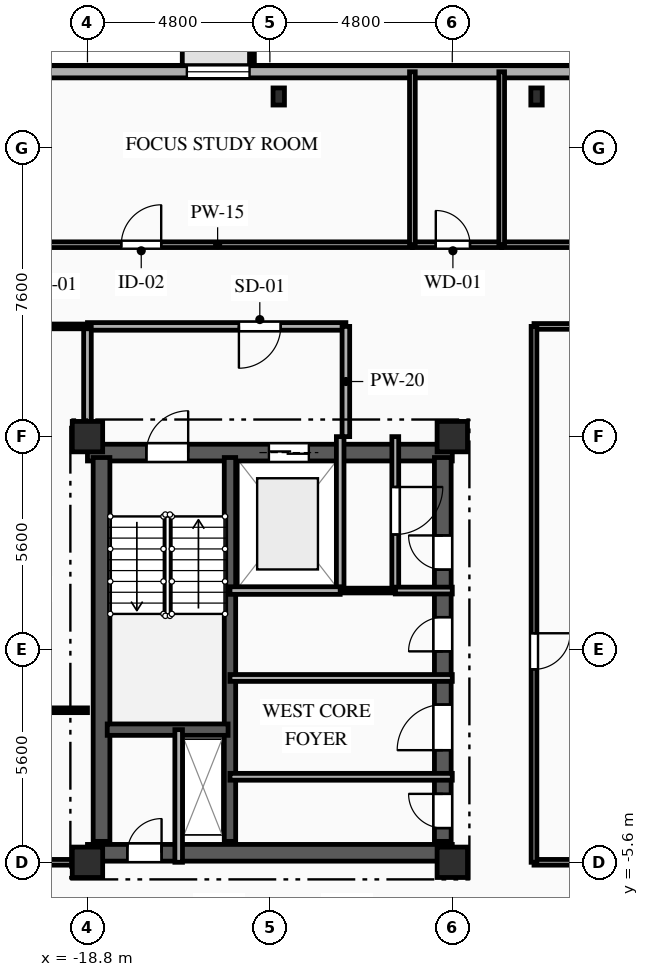
"""IFC4 building model, lengths in metres.
Left out: names, types, materials, properties, quantities, classifications, styles, units other than length and angle.
Written with IfcOpenShell. Run it as: python <this file> out.ifc"""

import sys

from ifc_helpers import new_model, si_unit, direction, frame, frame_2d, origin, origin_2d, place, context, subcontext, project, spatial, rectangle, i_section, extrude, element, fill, save


model = new_model("IFC4")
c1 = context("Model", 3, precision=1e-05, world=origin(), true_north=direction((0.0, 1.0)))
c2 = subcontext(c1, "Body", "Model", "MODEL_VIEW")
j1 = project(units=[si_unit("LENGTHUNIT", "METRE"), si_unit("PLANEANGLEUNIT", "RADIAN")], contexts=[c1])
p1 = place(None, origin())
s1 = spatial("IfcSite", under=j1, at=p1, CompositionType="ELEMENT")
p2 = place(p1, origin())
s2 = spatial("IfcBuilding", under=s1, at=p2, CompositionType="ELEMENT")
p3 = place(p2, frame((0.0, 0.0, 235.0)))
s3 = spatial("IfcBuildingStorey", under=s2, at=p3, CompositionType="ELEMENT", Elevation=235.0)
for number, where, z_axis, x_axis in (
    (1, (-18.8, -5.6, 0.0), (0.0, 0.0, 1.0), (1.0, 0.0, 0.0)),
    (2, (-18.8, 5.6, 0.0), (0.0, 0.0, 1.0), (1.0, 0.0, 0.0)),
    (3, (-9.2, -5.6, 0.0), (0.0, 0.0, 1.0), (1.0, 0.0, 0.0)),
    (4, (-9.2, 5.6, 0.0), (0.0, 0.0, 1.0), (1.0, 0.0, 0.0)),
):
    element("IfcColumn", number, at=place(p3, frame(where, z_axis=z_axis, x_axis=x_axis)), inside=s3, PredefinedType="COLUMN", context=c2, shape_type="SweptSolid", body=[
        extrude(rectangle(XDim=0.8, YDim=0.8, at=origin_2d()), origin(), (0.0, 0.0, 1.0), 3.35),
    ])
for number, where, z_axis, x_axis in (
    (5, (-6.983, 14.55, 0.0), (0.0, 0.0, 1.0), (1.0, 0.0, 0.0)),
    (6, (-13.767, 14.55, 0.0), (0.0, 0.0, 1.0), (1.0, 0.0, 0.0)),
):
    element("IfcColumn", number, at=place(p3, frame(where, z_axis=z_axis, x_axis=x_axis)), inside=s3, PredefinedType="COLUMN", context=c2, shape_type="SweptSolid", body=[
        extrude(i_section(OverallWidth=0.3, OverallDepth=0.45, WebThickness=0.014, FlangeThickness=0.026, FilletRadius=0.027, at=origin_2d()), origin(), (0.0, 0.0, 1.0), 3.35),
    ])
p4 = place(p3, frame((-21.2, 15.2, 0.0), z_axis=(0.0, 0.0, 1.0), x_axis=(1.0, 0.0, 0.0)))
e7 = element("IfcWall", 7, at=p4, inside=s3, PredefinedType="SOLIDWALL", context=c2, shape_type="SweptSolid", body=[
    extrude(rectangle(XDim=42.0, YDim=0.32, at=frame_2d((21.0, 0.0))), origin(), (0.0, 0.0, 1.0), 3.04),
])
p5 = place(p4, frame((5.015, 0.0, 0.85)))
e8 = element("IfcOpeningElement", 8, at=p5, cuts=e7, PredefinedType="OPENING", context=c2, shape_type="SweptSolid", body=[
    extrude(rectangle(XDim=1.65, YDim=1.85, at=frame_2d((0.825, 0.925))), frame((0.0, 0.17, 0.0), z_axis=(0.0, -1.0, 0.0), x_axis=(1.0, 0.0, 0.0)), (0.0, 0.0, 1.0), 0.34),
])
p6 = place(p4, frame((16.53, 0.0, 0.85)))
e9 = element("IfcOpeningElement", 9, at=p6, cuts=e7, PredefinedType="OPENING", context=c2, shape_type="SweptSolid", body=[
    extrude(rectangle(XDim=1.5, YDim=1.85, at=frame_2d((0.75, 0.925))), frame((0.0, 0.17, 0.0), z_axis=(0.0, -1.0, 0.0), x_axis=(1.0, 0.0, 0.0)), (0.0, 0.0, 1.0), 0.34),
])
p7 = place(p4, frame((25.575, 0.0, 0.85)))
e10 = element("IfcOpeningElement", 10, at=p7, cuts=e7, PredefinedType="OPENING", context=c2, shape_type="SweptSolid", body=[
    extrude(rectangle(XDim=1.65, YDim=1.85, at=frame_2d((0.825, 0.925))), frame((0.0, 0.17, 0.0), z_axis=(0.0, -1.0, 0.0), x_axis=(1.0, 0.0, 0.0)), (0.0, 0.0, 1.0), 0.34),
])
p8 = place(p4, frame((35.735, 0.0, 0.85)))
e11 = element("IfcOpeningElement", 11, at=p8, cuts=e7, PredefinedType="OPENING", context=c2, shape_type="SweptSolid", body=[
    extrude(rectangle(XDim=1.65, YDim=1.85, at=frame_2d((0.825, 0.925))), frame((0.0, 0.17, 0.0), z_axis=(0.0, -1.0, 0.0), x_axis=(1.0, 0.0, 0.0)), (0.0, 0.0, 1.0), 0.34),
])
p9 = place(p3, frame((-18.8, 5.18, 0.0), z_axis=(0.0, 0.0, 1.0), x_axis=(1.0, 0.0, 0.0)))
e12 = element("IfcWall", 12, at=p9, inside=s3, PredefinedType="SHEAR", context=c2, shape_type="SweptSolid", body=[
    extrude(rectangle(XDim=9.6, YDim=0.44, at=frame_2d((4.8, 0.0))), origin(), (0.0, 0.0, 1.0), 3.04),
])
p10 = place(p9, frame((1.55, 0.0, 0.0)))
e13 = element("IfcOpeningElement", 13, at=p10, cuts=e12, PredefinedType="OPENING", context=c2, shape_type="SweptSolid", body=[
    extrude(rectangle(XDim=1.1, YDim=2.15, at=frame_2d((0.55, 1.075))), frame((0.0, 0.23, 0.0), z_axis=(0.0, -1.0, 0.0), x_axis=(1.0, 0.0, 0.0)), (0.0, 0.0, 1.0), 0.46),
])
p11 = place(p9, frame((4.775, 0.0, 0.0)))
e14 = element("IfcOpeningElement", 14, at=p11, cuts=e12, PredefinedType="OPENING", context=c2, shape_type="SweptSolid", body=[
    extrude(rectangle(XDim=1.05, YDim=2.1, at=frame_2d((0.525, 1.05))), frame((0.0, 0.23, 0.0), z_axis=(0.0, -1.0, 0.0), x_axis=(1.0, 0.0, 0.0)), (0.0, 0.0, 1.0), 0.46),
])
p12 = place(p3, frame((-18.8, -5.35, 0.0), z_axis=(0.0, 0.0, 1.0), x_axis=(1.0, 0.0, 0.0)))
e15 = element("IfcWall", 15, at=p12, inside=s3, PredefinedType="SHEAR", context=c2, shape_type="SweptSolid", body=[
    extrude(rectangle(XDim=9.6, YDim=0.44, at=frame_2d((4.8, 0.0))), origin(), (0.0, 0.0, 1.0), 3.04),
])
p13 = place(p12, frame((1.05, 0.0, 0.0)))
e16 = element("IfcOpeningElement", 16, at=p13, cuts=e15, PredefinedType="OPENING", context=c2, shape_type="SweptSolid", body=[
    extrude(rectangle(XDim=0.9, YDim=2.1, at=frame_2d((0.45, 1.05))), frame((0.0, 0.23, 0.0), z_axis=(0.0, -1.0, 0.0), x_axis=(1.0, 0.0, 0.0)), (0.0, 0.0, 1.0), 0.46),
])
p14 = place(p3, frame((-18.43, -5.05, 0.0), z_axis=(0.0, 0.0, 1.0), x_axis=(0.0, 1.0, 0.0)))
e17 = element("IfcWall", 17, at=p14, inside=s3, PredefinedType="SHEAR", context=c2, shape_type="SweptSolid", body=[
    extrude(rectangle(XDim=10.1, YDim=0.44, at=frame_2d((5.05, 0.0))), origin(), (0.0, 0.0, 1.0), 3.04),
])
p15 = place(p3, frame((-9.45, -5.05, 0.0), z_axis=(0.0, 0.0, 1.0), x_axis=(0.0, 1.0, 0.0)))
e18 = element("IfcWall", 18, at=p15, inside=s3, PredefinedType="SHEAR", context=c2, shape_type="SweptSolid", body=[
    extrude(rectangle(XDim=10.1, YDim=0.44, at=frame_2d((5.05, 0.0))), origin(), (0.0, 0.0, 1.0), 3.04),
])
p16 = place(p15, frame((7.15, 0.0, 0.0)))
e19 = element("IfcOpeningElement", 19, at=p16, cuts=e18, PredefinedType="OPENING", context=c2, shape_type="SweptSolid", body=[
    extrude(rectangle(XDim=0.9, YDim=2.1, at=frame_2d((0.45, 1.05))), frame((0.0, 0.23, 0.0), z_axis=(0.0, -1.0, 0.0), x_axis=(1.0, 0.0, 0.0)), (0.0, 0.0, 1.0), 0.46),
])
p17 = place(p15, frame((2.4, 0.0, 0.0)))
e20 = element("IfcOpeningElement", 20, at=p17, cuts=e18, PredefinedType="OPENING", context=c2, shape_type="SweptSolid", body=[
    extrude(rectangle(XDim=1.2, YDim=2.15, at=frame_2d((0.6, 1.075))), frame((0.0, 0.23, 0.0), z_axis=(0.0, -1.0, 0.0), x_axis=(1.0, 0.0, 0.0)), (0.0, 0.0, 1.0), 0.46),
])
p18 = place(p15, frame((0.35, 0.0, 0.0)))
e21 = element("IfcOpeningElement", 21, at=p18, cuts=e18, PredefinedType="OPENING", context=c2, shape_type="SweptSolid", body=[
    extrude(rectangle(XDim=0.9, YDim=2.1, at=frame_2d((0.45, 1.05))), frame((0.0, 0.23, 0.0), z_axis=(0.0, -1.0, 0.0), x_axis=(1.0, 0.0, 0.0)), (0.0, 0.0, 1.0), 0.46),
])
p19 = place(p15, frame((5.0, 0.0, 0.0)))
e22 = element("IfcOpeningElement", 22, at=p19, cuts=e18, PredefinedType="OPENING", context=c2, shape_type="SweptSolid", body=[
    extrude(rectangle(XDim=0.9, YDim=2.1, at=frame_2d((0.45, 1.05))), frame((0.0, 0.23, 0.0), z_axis=(0.0, -1.0, 0.0), x_axis=(1.0, 0.0, 0.0)), (0.0, 0.0, 1.0), 0.46),
])
p20 = place(p3, frame((-15.05, -5.05, 0.0), z_axis=(0.0, 0.0, 1.0), x_axis=(0.0, 1.0, 0.0)))
e23 = element("IfcWall", 23, at=p20, inside=s3, PredefinedType="SHEAR", context=c2, shape_type="SweptSolid", body=[
    extrude(rectangle(XDim=10.1, YDim=0.3, at=frame_2d((5.05, 0.0))), origin(), (0.0, 0.0, 1.0), 3.04),
])
p21 = place(p3, frame((-18.28, -2.11, 0.0), z_axis=(0.0, 0.0, 1.0), x_axis=(1.0, 0.0, 0.0)))
e24 = element("IfcWall", 24, at=p21, inside=s3, PredefinedType="SHEAR", context=c2, shape_type="SweptSolid", body=[
    extrude(rectangle(XDim=3.18, YDim=0.3, at=frame_2d((1.59, 0.0))), origin(), (0.0, 0.0, 1.0), 3.04),
])
p22 = place(p3, frame((-16.4, -5.6, 0.0), z_axis=(0.0, 0.0, 1.0), x_axis=(0.0, 1.0, 0.0)))
e25 = element("IfcWall", 25, at=p22, inside=s3, PredefinedType="PARTITIONING", context=c2, shape_type="SweptSolid", body=[
    extrude(rectangle(XDim=3.49, YDim=0.2, at=frame_2d((1.745, 0.0))), origin(), (0.0, 0.0, 1.0), 3.04),
])
p23 = place(p3, frame((-12.15, 1.55, 0.0), z_axis=(0.0, 0.0, 1.0), x_axis=(0.0, 1.0, 0.0)))
e26 = element("IfcWall", 26, at=p23, inside=s3, PredefinedType="PARTITIONING", context=c2, shape_type="SweptSolid", body=[
    extrude(rectangle(XDim=4.05, YDim=0.2, at=frame_2d((2.025, 0.0))), origin(), (0.0, 0.0, 1.0), 3.04),
])
p24 = place(p3, frame((-12.0, 8.5, 0.0), z_axis=(0.0, 0.0, 1.0), x_axis=(-1.0, 0.0, 0.0)))
e27 = element("IfcWall", 27, at=p24, inside=s3, PredefinedType="PARTITIONING", context=c2, shape_type="SweptSolid", body=[
    extrude(rectangle(XDim=6.8, YDim=0.2, at=frame_2d((3.4, 0.0))), origin(), (0.0, 0.0, 1.0), 3.04),
])
p25 = place(p24, frame((1.715, 0.0, 0.0)))
e28 = element("IfcOpeningElement", 28, at=p25, cuts=e27, PredefinedType="OPENING", context=c2, shape_type="SweptSolid", body=[
    extrude(rectangle(XDim=1.1, YDim=2.15, at=frame_2d((0.55, 1.075))), frame((0.0, 0.11, 0.0), z_axis=(0.0, -1.0, 0.0), x_axis=(1.0, 0.0, 0.0)), (0.0, 0.0, 1.0), 0.22),
])
p26 = place(p3, frame((-12.0, 5.6, 0.0), z_axis=(0.0, 0.0, 1.0), x_axis=(0.0, 1.0, 0.0)))
e29 = element("IfcWall", 29, at=p26, inside=s3, PredefinedType="PARTITIONING", context=c2, shape_type="SweptSolid", body=[
    extrude(rectangle(XDim=2.9, YDim=0.2, at=frame_2d((1.45, 0.0))), origin(), (0.0, 0.0, 1.0), 3.04),
])
p27 = place(p3, frame((-18.8, 8.5, 0.0), z_axis=(0.0, 0.0, 1.0), x_axis=(0.0, -1.0, 0.0)))
e30 = element("IfcWall", 30, at=p27, inside=s3, PredefinedType="PARTITIONING", context=c2, shape_type="SweptSolid", body=[
    extrude(rectangle(XDim=2.9, YDim=0.2, at=frame_2d((1.45, 0.0))), origin(), (0.0, 0.0, 1.0), 2.665),
])
p28 = place(p3, frame((-10.7, 5.6, 0.0), z_axis=(0.0, 0.0, 1.0), x_axis=(0.0, -1.0, 0.0)))
e31 = element("IfcWall", 31, at=p28, inside=s3, PredefinedType="PARTITIONING", context=c2, shape_type="SweptSolid", body=[
    extrude(rectangle(XDim=4.05, YDim=0.18, at=frame_2d((2.025, 0.0))), origin(), (0.0, 0.0, 1.0), 3.04),
])
p29 = place(p28, frame((1.325, 0.0, 0.0)))
e32 = element("IfcOpeningElement", 32, at=p29, cuts=e31, PredefinedType="OPENING", context=c2, shape_type="SweptSolid", body=[
    extrude(rectangle(XDim=1.25, YDim=2.2, at=frame_2d((0.625, 1.1))), frame((0.0, 0.1, 0.0), z_axis=(0.0, -1.0, 0.0), x_axis=(1.0, 0.0, 0.0)), (0.0, 0.0, 1.0), 0.2),
])
p30 = place(p3, frame((-10.7, 1.55, 0.0), z_axis=(0.0, 0.0, 1.0), x_axis=(1.0, 0.0, 0.0)))
e33 = element("IfcWall", 33, at=p30, inside=s3, PredefinedType="PARTITIONING", context=c2, shape_type="SweptSolid", body=[
    extrude(rectangle(XDim=1.5, YDim=0.18, at=frame_2d((0.75, 0.0))), origin(), (0.0, 0.0, 1.0), 3.04),
])
p31 = place(p3, frame((-12.15, 1.55, 0.0), z_axis=(0.0, 0.0, 1.0), x_axis=(1.0, 0.0, 0.0)))
e34 = element("IfcWall", 34, at=p31, inside=s3, PredefinedType="PARTITIONING", context=c2, shape_type="SweptSolid", body=[
    extrude(rectangle(XDim=1.45, YDim=0.125, at=frame_2d((0.725, 0.0))), origin(), (0.0, 0.0, 1.0), 3.04),
])
p32 = place(p3, frame((-15.05, -3.35, 0.0), z_axis=(0.0, 0.0, 1.0), x_axis=(1.0, 0.0, 0.0)))
e35 = element("IfcWall", 35, at=p32, inside=s3, PredefinedType="PARTITIONING", context=c2, shape_type="SweptSolid", body=[
    extrude(rectangle(XDim=5.85, YDim=0.18, at=frame_2d((2.925, 0.0))), origin(), (0.0, 0.0, 1.0), 2.755),
])
p33 = place(p3, frame((-9.2, -0.75, 0.0), z_axis=(0.0, 0.0, 1.0), x_axis=(-1.0, 0.0, 0.0)))
e36 = element("IfcWall", 36, at=p33, inside=s3, PredefinedType="PARTITIONING", context=c2, shape_type="SweptSolid", body=[
    extrude(rectangle(XDim=5.85, YDim=0.18, at=frame_2d((2.925, 0.0))), origin(), (0.0, 0.0, 1.0), 3.04),
])
p34 = place(p3, frame((-18.8, 8.5, 0.0), z_axis=(0.0, 0.0, 1.0), x_axis=(-1.0, 0.0, 0.0)))
e37 = element("IfcWall", 37, at=p34, inside=s3, PredefinedType="PARTITIONING", context=c2, shape_type="SweptSolid", body=[
    extrude(rectangle(XDim=1.7, YDim=0.125, at=frame_2d((0.85, 0.0))), origin(), (0.0, 0.0, 1.0), 3.04),
])
p35 = place(p3, frame((-20.5, 10.65, 0.0), z_axis=(0.0, 0.0, 1.0), x_axis=(1.0, 0.0, 0.0)))
e38 = element("IfcWall", 38, at=p35, inside=s3, PredefinedType="PARTITIONING", context=c2, shape_type="SweptSolid", body=[
    extrude(rectangle(XDim=10.25, YDim=0.15, at=frame_2d((5.125, 0.0))), origin(), (0.0, 0.0, 1.0), 3.04),
])
p36 = place(p35, frame((2.59, 0.0, 0.0)))
e39 = element("IfcOpeningElement", 39, at=p36, cuts=e38, PredefinedType="OPENING", context=c2, shape_type="SweptSolid", body=[
    extrude(rectangle(XDim=1.05, YDim=2.15, at=frame_2d((0.525, 1.075))), frame((0.0, 0.085, 0.0), z_axis=(0.0, -1.0, 0.0), x_axis=(1.0, 0.0, 0.0)), (0.0, 0.0, 1.0), 0.17),
])
p37 = place(p3, frame((-10.25, 10.65, 0.0), z_axis=(0.0, 0.0, 1.0), x_axis=(1.0, 0.0, 0.0)))
e40 = element("IfcWall", 40, at=p37, inside=s3, PredefinedType="PLUMBINGWALL", context=c2, shape_type="SweptSolid", body=[
    extrude(rectangle(XDim=2.35, YDim=0.15, at=frame_2d((1.175, 0.0))), origin(), (0.0, 0.0, 1.0), 3.04),
])
p38 = place(p37, frame((0.616, 0.0, 0.0)))
e41 = element("IfcOpeningElement", 41, at=p38, cuts=e40, PredefinedType="OPENING", context=c2, shape_type="SweptSolid", body=[
    extrude(rectangle(XDim=0.9, YDim=2.1, at=frame_2d((0.45, 1.05))), frame((0.0, 0.085, 0.0), z_axis=(0.0, -1.0, 0.0), x_axis=(1.0, 0.0, 0.0)), (0.0, 0.0, 1.0), 0.17),
])
p39 = place(p3, frame((-7.9, 10.65, 0.0), z_axis=(0.0, 0.0, 1.0), x_axis=(1.0, 0.0, 0.0)))
e42 = element("IfcWall", 42, at=p39, inside=s3, PredefinedType="PARTITIONING", context=c2, shape_type="SweptSolid", body=[
    extrude(rectangle(XDim=7.9, YDim=0.15, at=frame_2d((3.95, 0.0))), origin(), (0.0, 0.0, 1.0), 3.04),
])
p40 = place(p39, frame((3.475, 0.0, 0.0)))
e43 = element("IfcOpeningElement", 43, at=p40, cuts=e42, PredefinedType="OPENING", context=c2, shape_type="SweptSolid", body=[
    extrude(rectangle(XDim=0.95, YDim=2.1, at=frame_2d((0.475, 1.05))), frame((0.0, 0.085, 0.0), z_axis=(0.0, -1.0, 0.0), x_axis=(1.0, 0.0, 0.0)), (0.0, 0.0, 1.0), 0.17),
])
p41 = place(p3, frame((0.0, 8.5, 0.0), z_axis=(0.0, 0.0, 1.0), x_axis=(-1.0, 0.0, 0.0)))
e44 = element("IfcWall", 44, at=p41, inside=s3, PredefinedType="PARTITIONING", context=c2, shape_type="SweptSolid", body=[
    extrude(rectangle(XDim=7.05, YDim=0.15, at=frame_2d((3.525, 0.0))), origin(), (0.0, 0.0, 1.0), 3.04),
])
p42 = place(p3, frame((-20.5, -5.6, 0.0), z_axis=(0.0, 0.0, 1.0), x_axis=(1.0, 0.0, 0.0)))
e45 = element("IfcWall", 45, at=p42, inside=s3, PredefinedType="PARTITIONING", context=c2, shape_type="SweptSolid", body=[
    extrude(rectangle(XDim=1.7, YDim=0.15, at=frame_2d((0.85, 0.0))), origin(), (0.0, 0.0, 1.0), 3.04),
])
p43 = place(p3, frame((-7.05, -5.6, 0.0), z_axis=(0.0, 0.0, 1.0), x_axis=(1.0, 0.0, 0.0)))
e46 = element("IfcWall", 46, at=p43, inside=s3, PredefinedType="PARTITIONING", context=c2, shape_type="SweptSolid", body=[
    extrude(rectangle(XDim=7.05, YDim=0.15, at=frame_2d((3.525, 0.0))), origin(), (0.0, 0.0, 1.0), 2.525),
])
p44 = place(p3, frame((-7.05, 8.5, 0.0), z_axis=(0.0, 0.0, 1.0), x_axis=(0.0, -1.0, 0.0)))
e47 = element("IfcWall", 47, at=p44, inside=s3, PredefinedType="PARTITIONING", context=c2, shape_type="SweptSolid", body=[
    extrude(rectangle(XDim=14.1, YDim=0.15, at=frame_2d((7.05, 0.0))), origin(), (0.0, 0.0, 1.0), 3.04),
])
p45 = place(p44, frame((8.074, 0.0, 0.0)))
e48 = element("IfcOpeningElement", 48, at=p45, cuts=e47, PredefinedType="OPENING", context=c2, shape_type="SweptSolid", body=[
    extrude(rectangle(XDim=0.95, YDim=2.1, at=frame_2d((0.475, 1.05))), frame((0.0, 0.085, 0.0), z_axis=(0.0, -1.0, 0.0), x_axis=(1.0, 0.0, 0.0)), (0.0, 0.0, 1.0), 0.17),
])
p46 = place(p3, frame((-24.0, -1.6, 0.0), z_axis=(0.0, 0.0, 1.0), x_axis=(1.0, 0.0, 0.0)))
e49 = element("IfcWall", 49, at=p46, inside=s3, PredefinedType="PARTITIONING", context=c2, shape_type="SweptSolid", body=[
    extrude(rectangle(XDim=5.2, YDim=0.125, at=frame_2d((2.6, 0.0))), origin(), (0.0, 0.0, 1.0), 3.04),
])
p47 = place(p3, frame((-10.25, 15.2, 0.0), z_axis=(0.0, 0.0, 1.0), x_axis=(0.0, -1.0, 0.0)))
e50 = element("IfcWall", 50, at=p47, inside=s3, PredefinedType="PLUMBINGWALL", context=c2, shape_type="SweptSolid", body=[
    extrude(rectangle(XDim=4.55, YDim=0.15, at=frame_2d((2.275, 0.0))), origin(), (0.0, 0.0, 1.0), 3.04),
])
p48 = place(p3, frame((-7.9, 15.2, 0.0), z_axis=(0.0, 0.0, 1.0), x_axis=(0.0, -1.0, 0.0)))
e51 = element("IfcWall", 51, at=p48, inside=s3, PredefinedType="PLUMBINGWALL", context=c2, shape_type="SweptSolid", body=[
    extrude(rectangle(XDim=4.55, YDim=0.15, at=frame_2d((2.275, 0.0))), origin(), (0.0, 0.0, 1.0), 2.665),
])
p49 = place(p3, frame((-15.05, 1.55, 0.0), z_axis=(0.0, 0.0, 1.0), x_axis=(1.0, 0.0, 0.0)))
e52 = element("IfcWall", 52, at=p49, inside=s3, PredefinedType="PARTITIONING", context=c2, shape_type="SweptSolid", body=[
    extrude(rectangle(XDim=2.9, YDim=0.2, at=frame_2d((1.45, 0.0))), origin(), (0.0, 0.0, 1.0), 3.04),
])
p50 = place(p5, origin())
e53 = element("IfcWindow", 53, at=p50, inside=s3, PartitioningType="SINGLE_PANEL", PredefinedType="WINDOW", context=c2, shape_type="SweptSolid", body=[
    extrude(rectangle(XDim=1.65, YDim=1.85, at=frame_2d((0.825, 0.925))), frame((0.0, 0.03, 0.0), z_axis=(0.0, -1.0, 0.0), x_axis=(1.0, 0.0, 0.0)), (0.0, 0.0, 1.0), 0.06),
])
fill(e8, e53)
p51 = place(p10, origin())
e54 = element("IfcDoor", 54, at=p51, inside=s3, OperationType="SINGLE_SWING_RIGHT", PredefinedType="DOOR", context=c2, shape_type="SweptSolid", body=[
    extrude(rectangle(XDim=1.1, YDim=2.15, at=frame_2d((0.55, 1.075))), frame((0.0, 0.025, 0.0), z_axis=(0.0, -1.0, 0.0), x_axis=(1.0, 0.0, 0.0)), (0.0, 0.0, 1.0), 0.05),
])
fill(e13, e54)
p52 = place(p11, origin())
e55 = element("IfcDoor", 55, at=p52, inside=s3, OperationType="DOUBLE_DOOR_SLIDING", PredefinedType="DOOR", context=c2, shape_type="SweptSolid", body=[
    extrude(rectangle(XDim=1.05, YDim=2.1, at=frame_2d((0.525, 1.05))), frame((0.0, 0.025, 0.0), z_axis=(0.0, -1.0, 0.0), x_axis=(1.0, 0.0, 0.0)), (0.0, 0.0, 1.0), 0.05),
])
fill(e14, e55)
p53 = place(p13, origin())
e56 = element("IfcDoor", 56, at=p53, inside=s3, OperationType="SINGLE_SWING_RIGHT", PredefinedType="DOOR", context=c2, shape_type="SweptSolid", body=[
    extrude(rectangle(XDim=0.9, YDim=2.1, at=frame_2d((0.45, 1.05))), frame((0.0, 0.025, 0.0), z_axis=(0.0, -1.0, 0.0), x_axis=(1.0, 0.0, 0.0)), (0.0, 0.0, 1.0), 0.05),
])
fill(e16, e56)
p54 = place(p25, origin())
e57 = element("IfcDoor", 57, at=p54, inside=s3, OperationType="SINGLE_SWING_RIGHT", PredefinedType="DOOR", context=c2, shape_type="SweptSolid", body=[
    extrude(rectangle(XDim=1.1, YDim=2.15, at=frame_2d((0.55, 1.075))), frame((0.0, 0.025, 0.0), z_axis=(0.0, -1.0, 0.0), x_axis=(1.0, 0.0, 0.0)), (0.0, 0.0, 1.0), 0.05),
])
fill(e28, e57)
p55 = place(p29, origin())
e58 = element("IfcDoor", 58, at=p55, inside=s3, OperationType="SINGLE_SWING_LEFT", PredefinedType="DOOR", context=c2, shape_type="SweptSolid", body=[
    extrude(rectangle(XDim=1.25, YDim=2.2, at=frame_2d((0.625, 1.1))), frame((0.0, 0.025, 0.0), z_axis=(0.0, -1.0, 0.0), x_axis=(1.0, 0.0, 0.0)), (0.0, 0.0, 1.0), 0.05),
])
fill(e32, e58)
p56 = place(p16, origin())
e59 = element("IfcDoor", 59, at=p56, inside=s3, OperationType="SINGLE_SWING_RIGHT", PredefinedType="DOOR", context=c2, shape_type="SweptSolid", body=[
    extrude(rectangle(XDim=0.9, YDim=2.1, at=frame_2d((0.45, 1.05))), frame((0.0, 0.025, 0.0), z_axis=(0.0, -1.0, 0.0), x_axis=(1.0, 0.0, 0.0)), (0.0, 0.0, 1.0), 0.05),
])
fill(e19, e59)
p57 = place(p17, origin())
e60 = element("IfcDoor", 60, at=p57, inside=s3, OperationType="SINGLE_SWING_LEFT", PredefinedType="DOOR", context=c2, shape_type="SweptSolid", body=[
    extrude(rectangle(XDim=1.2, YDim=2.15, at=frame_2d((0.6, 1.075))), frame((0.0, 0.025, 0.0), z_axis=(0.0, -1.0, 0.0), x_axis=(1.0, 0.0, 0.0)), (0.0, 0.0, 1.0), 0.05),
])
fill(e20, e60)
p58 = place(p18, origin())
e61 = element("IfcDoor", 61, at=p58, inside=s3, OperationType="SINGLE_SWING_RIGHT", PredefinedType="DOOR", context=c2, shape_type="SweptSolid", body=[
    extrude(rectangle(XDim=0.9, YDim=2.1, at=frame_2d((0.45, 1.05))), frame((0.0, 0.025, 0.0), z_axis=(0.0, -1.0, 0.0), x_axis=(1.0, 0.0, 0.0)), (0.0, 0.0, 1.0), 0.05),
])
fill(e21, e61)
p59 = place(p19, origin())
e62 = element("IfcDoor", 62, at=p59, inside=s3, OperationType="SINGLE_SWING_LEFT", PredefinedType="DOOR", context=c2, shape_type="SweptSolid", body=[
    extrude(rectangle(XDim=0.9, YDim=2.1, at=frame_2d((0.45, 1.05))), frame((0.0, 0.025, 0.0), z_axis=(0.0, -1.0, 0.0), x_axis=(1.0, 0.0, 0.0)), (0.0, 0.0, 1.0), 0.05),
])
fill(e22, e62)
p60 = place(p36, origin())
e63 = element("IfcDoor", 63, at=p60, inside=s3, OperationType="SINGLE_SWING_RIGHT", PredefinedType="DOOR", context=c2, shape_type="SweptSolid", body=[
    extrude(rectangle(XDim=1.05, YDim=2.15, at=frame_2d((0.525, 1.075))), frame((0.0, 0.025, 0.0), z_axis=(0.0, -1.0, 0.0), x_axis=(1.0, 0.0, 0.0)), (0.0, 0.0, 1.0), 0.05),
])
fill(e39, e63)
p61 = place(p38, origin())
e64 = element("IfcDoor", 64, at=p61, inside=s3, OperationType="SINGLE_SWING_LEFT", PredefinedType="DOOR", context=c2, shape_type="SweptSolid", body=[
    extrude(rectangle(XDim=0.9, YDim=2.1, at=frame_2d((0.45, 1.05))), frame((0.0, 0.025, 0.0), z_axis=(0.0, -1.0, 0.0), x_axis=(1.0, 0.0, 0.0)), (0.0, 0.0, 1.0), 0.05),
])
fill(e41, e64)
p62 = place(p45, origin())
e65 = element("IfcDoor", 65, at=p62, inside=s3, OperationType="SINGLE_SWING_LEFT", PredefinedType="DOOR", context=c2, shape_type="SweptSolid", body=[
    extrude(rectangle(XDim=0.95, YDim=2.1, at=frame_2d((0.475, 1.05))), frame((0.0, 0.025, 0.0), z_axis=(0.0, -1.0, 0.0), x_axis=(1.0, 0.0, 0.0)), (0.0, 0.0, 1.0), 0.05),
])
fill(e48, e65)
save(model, sys.argv[1])
